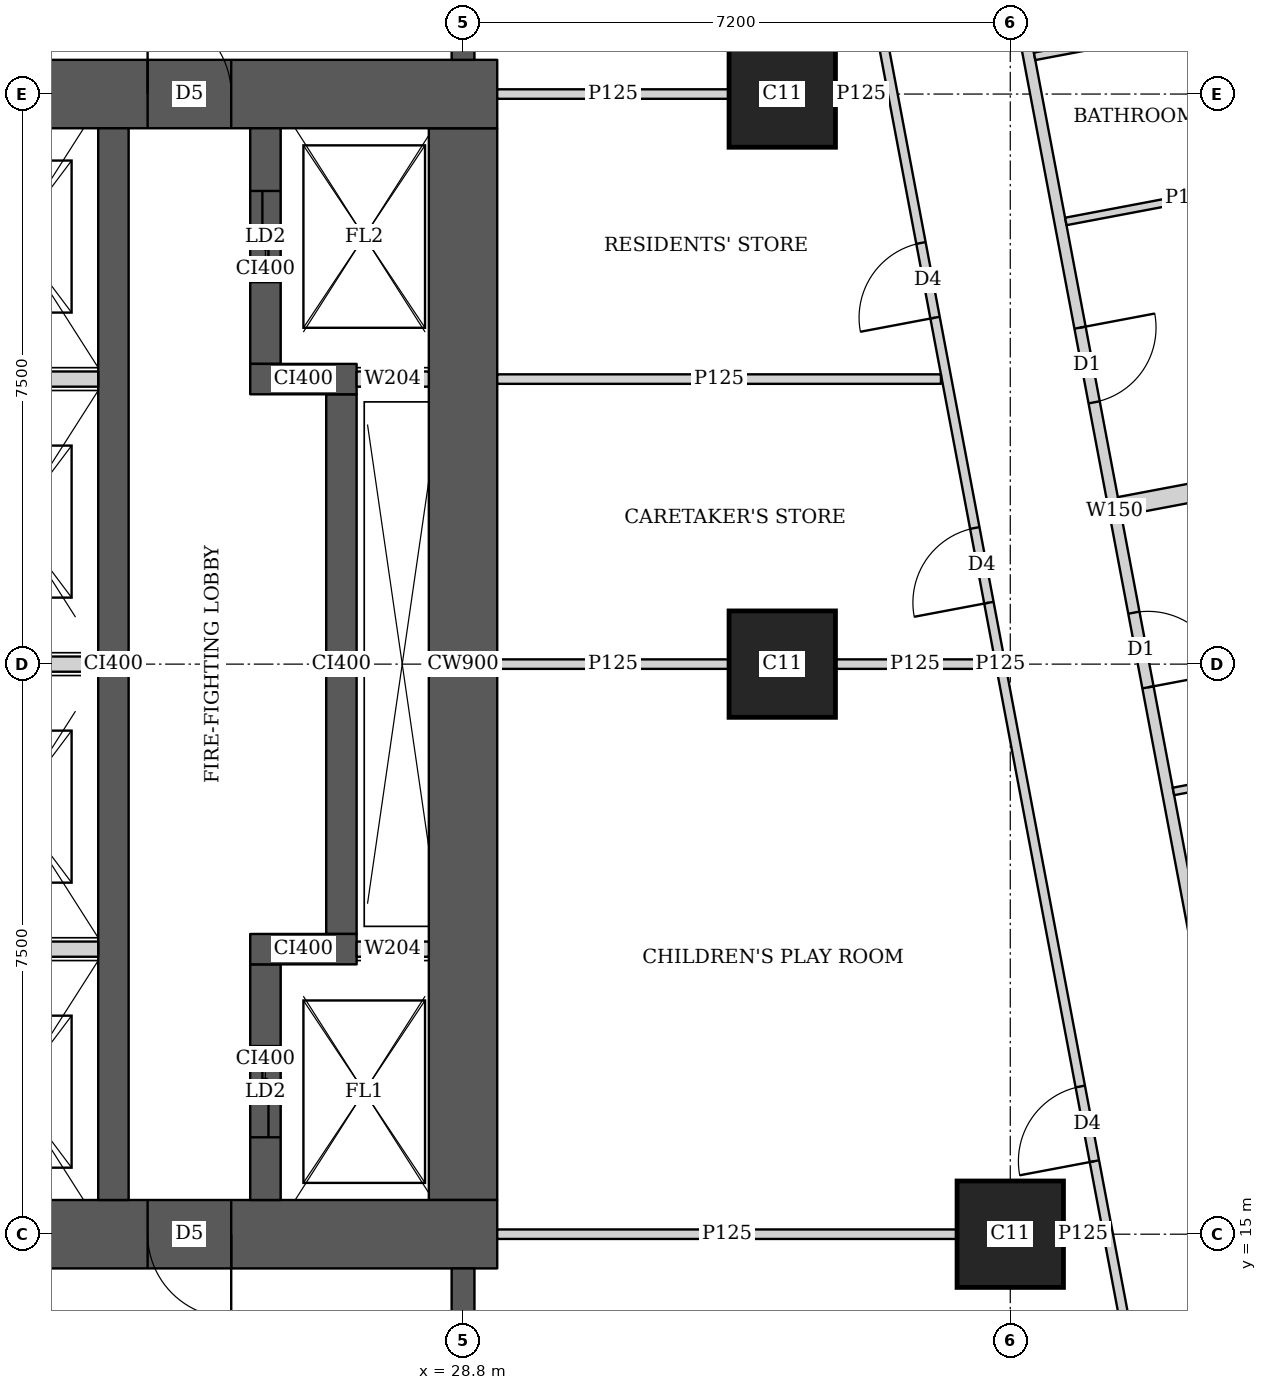
"""IFC4 building model, lengths in metres.
Left out: names, types, materials, properties, quantities, classifications, styles, units other than length and angle.
Written with IfcOpenShell. Run it as: python <this file> out.ifc"""

import sys

from ifc_helpers import new_model, si_unit, direction, frame, frame_2d, origin, origin_2d, place, context, subcontext, project, spatial, rectangle, extrude, element, fill, save


model = new_model("IFC4")
c1 = context("Model", 3, precision=1e-05, world=origin(), true_north=direction((0.0, 1.0)))
c2 = subcontext(c1, "Body", "Model", "MODEL_VIEW")
j1 = project(units=[si_unit("LENGTHUNIT", "METRE"), si_unit("PLANEANGLEUNIT", "RADIAN")], contexts=[c1])
p1 = place(None, origin())
s1 = spatial("IfcSite", under=j1, at=p1, CompositionType="ELEMENT")
p2 = place(p1, origin())
s2 = spatial("IfcBuilding", under=s1, at=p2, CompositionType="ELEMENT")
p3 = place(p2, frame((0.0, 0.0, 262.85)))
s3 = spatial("IfcBuildingStorey", under=s2, at=p3, CompositionType="ELEMENT", Elevation=262.85)
for number, where, z_axis, x_axis in (
    (1, (36.0, 15.0, 0.0), (0.0, 0.0, 1.0), (1.0, 0.0, 0.0)),
    (2, (33.0, 22.5, 0.0), (0.0, 0.0, 1.0), (1.0, 0.0, 0.0)),
    (3, (33.0, 30.0, 0.0), (0.0, 0.0, 1.0), (1.0, 0.0, 0.0)),
):
    element("IfcColumn", number, at=place(p3, frame(where, z_axis=z_axis, x_axis=x_axis)), inside=s3, PredefinedType="COLUMN", context=c2, shape_type="SweptSolid", body=[
        extrude(rectangle(XDim=1.4, YDim=1.4, at=origin_2d()), origin(), (0.0, 0.0, 1.0), 3.75),
    ])
p4 = place(p3, frame((13.95, 15.0, 0.0), z_axis=(0.0, 0.0, 1.0), x_axis=(1.0, 0.0, 0.0)))
e4 = element("IfcWall", 4, at=p4, inside=s3, PredefinedType="SHEAR", context=c2, shape_type="SweptSolid", body=[
    extrude(rectangle(XDim=15.3, YDim=0.9, at=frame_2d((7.65, 0.0))), origin(), (0.0, 0.0, 1.0), 3.75),
])
p5 = place(p4, frame((4.45, 0.0, 0.0)))
e5 = element("IfcOpeningElement", 5, at=p5, cuts=e4, PredefinedType="OPENING", context=c2, shape_type="SweptSolid", body=[
    extrude(rectangle(XDim=1.8, YDim=2.1, at=frame_2d((0.9, 1.05))), frame((0.0, 0.46, 0.0), z_axis=(0.0, -1.0, 0.0), x_axis=(1.0, 0.0, 0.0)), (0.0, 0.0, 1.0), 0.92),
])
p6 = place(p4, frame((10.7, 0.0, 0.0)))
e6 = element("IfcOpeningElement", 6, at=p6, cuts=e4, PredefinedType="OPENING", context=c2, shape_type="SweptSolid", body=[
    extrude(rectangle(XDim=1.1, YDim=2.1, at=frame_2d((0.55, 1.05))), frame((0.0, 0.46, 0.0), z_axis=(0.0, -1.0, 0.0), x_axis=(1.0, 0.0, 0.0)), (0.0, 0.0, 1.0), 0.92),
])
p7 = place(p3, frame((13.95, 30.0, 0.0), z_axis=(0.0, 0.0, 1.0), x_axis=(1.0, 0.0, 0.0)))
e7 = element("IfcWall", 7, at=p7, inside=s3, PredefinedType="SHEAR", context=c2, shape_type="SweptSolid", body=[
    extrude(rectangle(XDim=15.3, YDim=0.9, at=frame_2d((7.65, 0.0))), origin(), (0.0, 0.0, 1.0), 3.75),
])
p8 = place(p7, frame((4.45, 0.0, 0.0)))
e8 = element("IfcOpeningElement", 8, at=p8, cuts=e7, PredefinedType="OPENING", context=c2, shape_type="SweptSolid", body=[
    extrude(rectangle(XDim=1.8, YDim=2.1, at=frame_2d((0.9, 1.05))), frame((0.0, 0.46, 0.0), z_axis=(0.0, -1.0, 0.0), x_axis=(1.0, 0.0, 0.0)), (0.0, 0.0, 1.0), 0.92),
])
p9 = place(p7, frame((10.7, 0.0, 0.0)))
e9 = element("IfcOpeningElement", 9, at=p9, cuts=e7, PredefinedType="OPENING", context=c2, shape_type="SweptSolid", body=[
    extrude(rectangle(XDim=1.1, YDim=2.1, at=frame_2d((0.55, 1.05))), frame((0.0, 0.46, 0.0), z_axis=(0.0, -1.0, 0.0), x_axis=(1.0, 0.0, 0.0)), (0.0, 0.0, 1.0), 0.92),
])
p10 = place(p3, frame((28.8, 15.45, 0.0), z_axis=(0.0, 0.0, 1.0), x_axis=(0.0, 1.0, 0.0)))
e10 = element("IfcWall", 10, at=p10, inside=s3, PredefinedType="SHEAR", context=c2, shape_type="SweptSolid", body=[
    extrude(rectangle(XDim=14.1, YDim=0.9, at=frame_2d((7.05, 0.0))), origin(), (0.0, 0.0, 1.0), 3.75),
])
p11 = place(p3, frame((24.2, 15.45, 0.0), z_axis=(0.0, 0.0, 1.0), x_axis=(0.0, 1.0, 0.0)))
e11 = element("IfcWall", 11, at=p11, inside=s3, PredefinedType="SHEAR", context=c2, shape_type="SweptSolid", body=[
    extrude(rectangle(XDim=14.1, YDim=0.4, at=frame_2d((7.05, 0.0))), origin(), (0.0, 0.0, 1.0), 3.75),
])
p12 = place(p3, frame((26.2, 15.45, 0.0), z_axis=(0.0, 0.0, 1.0), x_axis=(0.0, 1.0, 0.0)))
e12 = element("IfcWall", 12, at=p12, inside=s3, PredefinedType="SHEAR", context=c2, shape_type="SweptSolid", body=[
    extrude(rectangle(XDim=3.1, YDim=0.4, at=frame_2d((1.55, 0.0))), origin(), (0.0, 0.0, 1.0), 3.75),
])
p13 = place(p12, frame((0.825, 0.0, 0.0)))
e13 = element("IfcOpeningElement", 13, at=p13, cuts=e12, PredefinedType="OPENING", context=c2, shape_type="SweptSolid", body=[
    extrude(rectangle(XDim=1.2, YDim=2.1, at=frame_2d((0.6, 1.05))), frame((0.0, 0.21, 0.0), z_axis=(0.0, -1.0, 0.0), x_axis=(1.0, 0.0, 0.0)), (0.0, 0.0, 1.0), 0.42),
])
p14 = place(p3, frame((26.0, 18.75, 0.0), z_axis=(0.0, 0.0, 1.0), x_axis=(1.0, 0.0, 0.0)))
e14 = element("IfcWall", 14, at=p14, inside=s3, PredefinedType="SHEAR", context=c2, shape_type="SweptSolid", body=[
    extrude(rectangle(XDim=1.4, YDim=0.4, at=frame_2d((0.7, 0.0))), origin(), (0.0, 0.0, 1.0), 3.75),
])
p15 = place(p3, frame((27.2, 18.95, 0.0), z_axis=(0.0, 0.0, 1.0), x_axis=(0.0, 1.0, 0.0)))
e15 = element("IfcWall", 15, at=p15, inside=s3, PredefinedType="SHEAR", context=c2, shape_type="SweptSolid", body=[
    extrude(rectangle(XDim=7.1, YDim=0.4, at=frame_2d((3.55, 0.0))), origin(), (0.0, 0.0, 1.0), 3.75),
])
p16 = place(p3, frame((26.0, 26.25, 0.0), z_axis=(0.0, 0.0, 1.0), x_axis=(1.0, 0.0, 0.0)))
e16 = element("IfcWall", 16, at=p16, inside=s3, PredefinedType="SHEAR", context=c2, shape_type="SweptSolid", body=[
    extrude(rectangle(XDim=1.4, YDim=0.4, at=frame_2d((0.7, 0.0))), origin(), (0.0, 0.0, 1.0), 3.75),
])
p17 = place(p3, frame((26.2, 26.45, 0.0), z_axis=(0.0, 0.0, 1.0), x_axis=(0.0, 1.0, 0.0)))
e17 = element("IfcWall", 17, at=p17, inside=s3, PredefinedType="SHEAR", context=c2, shape_type="SweptSolid", body=[
    extrude(rectangle(XDim=3.1, YDim=0.4, at=frame_2d((1.55, 0.0))), origin(), (0.0, 0.0, 1.0), 3.75),
])
p18 = place(p17, frame((1.075, 0.0, 0.0)))
e18 = element("IfcOpeningElement", 18, at=p18, cuts=e17, PredefinedType="OPENING", context=c2, shape_type="SweptSolid", body=[
    extrude(rectangle(XDim=1.2, YDim=2.1, at=frame_2d((0.6, 1.05))), frame((0.0, 0.21, 0.0), z_axis=(0.0, -1.0, 0.0), x_axis=(1.0, 0.0, 0.0)), (0.0, 0.0, 1.0), 0.42),
])
for number, where, z_axis, x_axis in (
    (19, (28.8, 10.35, 0.0), (0.0, 0.0, 1.0), (0.0, 1.0, 0.0)),
    (20, (28.8, 30.45, 0.0), (0.0, 0.0, 1.0), (0.0, 1.0, 0.0)),
):
    element("IfcWall", number, at=place(p3, frame(where, z_axis=z_axis, x_axis=x_axis)), inside=s3, PredefinedType="SHEAR", context=c2, shape_type="SweptSolid", body=[
        extrude(rectangle(XDim=4.2, YDim=0.3, at=frame_2d((2.1, 0.0))), origin(), (0.0, 0.0, 1.0), 3.75),
    ])
p19 = place(p3, frame((34.036, 42.186, 0.0), z_axis=(0.0, 0.0, 1.0), x_axis=(0.185593518645, -0.9826266055, 0.0)))
e21 = element("IfcWall", 21, at=p19, inside=s3, PredefinedType="SOLIDWALL", context=c2, shape_type="SweptSolid", body=[
    extrude(rectangle(XDim=35.961, YDim=0.15, at=frame_2d((17.98, 0.0))), origin(), (0.0, 0.0, 1.0), 2.5),
])
p20 = place(p19, frame((15.529, 0.0, 0.0)))
e22 = element("IfcOpeningElement", 22, at=p20, cuts=e21, PredefinedType="OPENING", context=c2, shape_type="SweptSolid", body=[
    extrude(rectangle(XDim=1.0, YDim=2.1, at=frame_2d((0.5, 1.05))), frame((0.0, 0.085, 0.0), z_axis=(0.0, -1.0, 0.0), x_axis=(1.0, 0.0, 0.0)), (0.0, 0.0, 1.0), 0.17),
])
p21 = place(p19, frame((19.345, 0.0, 0.0)))
e23 = element("IfcOpeningElement", 23, at=p21, cuts=e21, PredefinedType="OPENING", context=c2, shape_type="SweptSolid", body=[
    extrude(rectangle(XDim=1.0, YDim=2.1, at=frame_2d((0.5, 1.05))), frame((0.0, 0.085, 0.0), z_axis=(0.0, -1.0, 0.0), x_axis=(1.0, 0.0, 0.0)), (0.0, 0.0, 1.0), 0.17),
])
p22 = place(p19, frame((30.594, 0.0, 0.0)))
e24 = element("IfcOpeningElement", 24, at=p22, cuts=e21, PredefinedType="OPENING", context=c2, shape_type="SweptSolid", body=[
    extrude(rectangle(XDim=1.0, YDim=2.1, at=frame_2d((0.5, 1.05))), frame((0.0, 0.085, 0.0), z_axis=(0.0, -1.0, 0.0), x_axis=(1.0, 0.0, 0.0)), (0.0, 0.0, 1.0), 0.17),
])
p23 = place(p3, frame((37.511, 42.109, 0.0), z_axis=(0.0, 0.0, 1.0), x_axis=(0.185550464988, -0.982634736279, 0.0)))
e25 = element("IfcWall", 25, at=p23, inside=s3, PredefinedType="PARTITIONING", context=c2, shape_type="SweptSolid", body=[
    extrude(rectangle(XDim=13.35, YDim=0.1, at=frame_2d((6.675, 0.0))), origin(), (0.0, 0.0, 1.0), 2.5),
])
p24 = place(p23, frame((11.845, 0.0, 0.0)))
e26 = element("IfcOpeningElement", 26, at=p24, cuts=e25, PredefinedType="OPENING", context=c2, shape_type="SweptSolid", body=[
    extrude(rectangle(XDim=0.9, YDim=2.1, at=frame_2d((0.45, 1.05))), frame((0.0, 0.06, 0.0), z_axis=(0.0, -1.0, 0.0), x_axis=(1.0, 0.0, 0.0)), (0.0, 0.0, 1.0), 0.12),
])
p25 = place(p23, frame((8.224, 0.0, 0.0)))
e27 = element("IfcOpeningElement", 27, at=p25, cuts=e25, PredefinedType="OPENING", context=c2, shape_type="SweptSolid", body=[
    extrude(rectangle(XDim=0.9, YDim=2.1, at=frame_2d((0.45, 1.05))), frame((0.0, 0.06, 0.0), z_axis=(0.0, -1.0, 0.0), x_axis=(1.0, 0.0, 0.0)), (0.0, 0.0, 1.0), 0.12),
])
p26 = place(p23, frame((2.65, 0.0, 0.0)))
e28 = element("IfcOpeningElement", 28, at=p26, cuts=e25, PredefinedType="OPENING", context=c2, shape_type="SweptSolid", body=[
    extrude(rectangle(XDim=0.9, YDim=2.1, at=frame_2d((0.45, 1.05))), frame((0.0, 0.06, 0.0), z_axis=(0.0, -1.0, 0.0), x_axis=(1.0, 0.0, 0.0)), (0.0, 0.0, 1.0), 0.12),
])
p27 = place(p23, frame((9.936, 0.0, 0.0)))
e29 = element("IfcOpeningElement", 29, at=p27, cuts=e25, PredefinedType="OPENING", context=c2, shape_type="SweptSolid", body=[
    extrude(rectangle(XDim=0.9, YDim=2.1, at=frame_2d((0.45, 1.05))), frame((0.0, 0.06, 0.0), z_axis=(0.0, -1.0, 0.0), x_axis=(1.0, 0.0, 0.0)), (0.0, 0.0, 1.0), 0.12),
])
p28 = place(p23, frame((5.555, 0.0, 0.0)))
e30 = element("IfcOpeningElement", 30, at=p28, cuts=e25, PredefinedType="OPENING", context=c2, shape_type="SweptSolid", body=[
    extrude(rectangle(XDim=0.9, YDim=2.1, at=frame_2d((0.45, 1.05))), frame((0.0, 0.06, 0.0), z_axis=(0.0, -1.0, 0.0), x_axis=(1.0, 0.0, 0.0)), (0.0, 0.0, 1.0), 0.12),
])
p29 = place(p3, frame((39.997, 28.942, 0.0), z_axis=(0.0, 0.0, 1.0), x_axis=(-0.982569883123, -0.185893584556, 0.0)))
e31 = element("IfcWall", 31, at=p29, inside=s3, PredefinedType="PARTITIONING", context=c2, shape_type="SweptSolid", body=[
    extrude(rectangle(XDim=3.324, YDim=0.1, at=frame_2d((1.662, 0.0))), origin(), (0.0, 0.0, 1.0), 3.5),
])
p30 = place(p3, frame((39.538, 31.104, 0.0), z_axis=(0.0, 0.0, 1.0), x_axis=(-0.982620626894, -0.185625169636, 0.0)))
e32 = element("IfcWall", 32, at=p30, inside=s3, PredefinedType="PARTITIONING", context=c2, shape_type="SweptSolid", body=[
    extrude(rectangle(XDim=3.275, YDim=0.1, at=frame_2d((1.637, 0.0))), origin(), (0.0, 0.0, 1.0), 2.5),
])
p31 = place(p3, frame((41.365, 21.433, 0.0), z_axis=(0.0, 0.0, 1.0), x_axis=(-0.982607026909, -0.185697147715, 0.0)))
e33 = element("IfcWall", 33, at=p31, inside=s3, PredefinedType="PARTITIONING", context=c2, shape_type="SweptSolid", body=[
    extrude(rectangle(XDim=3.275, YDim=0.1, at=frame_2d((1.637, 0.0))), origin(), (0.0, 0.0, 1.0), 3.5),
])
p32 = place(p3, frame((41.885, 25.415, 0.0), z_axis=(0.0, 0.0, 1.0), x_axis=(-0.982612837616, -0.185666398014, 0.0)))
e34 = element("IfcWall", 34, at=p32, inside=s3, PredefinedType="SOLIDWALL", context=c2, shape_type="SweptSolid", body=[
    extrude(rectangle(XDim=4.525, YDim=0.25, at=frame_2d((2.262, 0.0))), origin(), (0.0, 0.0, 1.0), 3.5),
])
p33 = place(p3, frame((38.202, 10.163, 0.0), z_axis=(0.0, 0.0, 1.0), x_axis=(-0.185610321132, 0.982623431783, 0.0)))
e35 = element("IfcWall", 35, at=p33, inside=s3, PredefinedType="PARTITIONING", context=c2, shape_type="SweptSolid", body=[
    extrude(rectangle(XDim=25.111, YDim=0.125, at=frame_2d((12.556, 0.0))), origin(), (0.0, 0.0, 1.0), 2.5),
])
p34 = place(p33, frame((0.708, 0.0, 0.0)))
e36 = element("IfcOpeningElement", 36, at=p34, cuts=e35, PredefinedType="OPENING", context=c2, shape_type="SweptSolid", body=[
    extrude(rectangle(XDim=1.0, YDim=2.1, at=frame_2d((0.5, 1.05))), frame((0.0, 0.073, 0.0), z_axis=(0.0, -1.0, 0.0), x_axis=(1.0, 0.0, 0.0)), (0.0, 0.0, 1.0), 0.145),
])
p35 = place(p33, frame((5.9, 0.0, 0.0)))
e37 = element("IfcOpeningElement", 37, at=p35, cuts=e35, PredefinedType="OPENING", context=c2, shape_type="SweptSolid", body=[
    extrude(rectangle(XDim=1.0, YDim=2.1, at=frame_2d((0.5, 1.05))), frame((0.0, 0.073, 0.0), z_axis=(0.0, -1.0, 0.0), x_axis=(1.0, 0.0, 0.0)), (0.0, 0.0, 1.0), 0.145),
])
p36 = place(p33, frame((13.378, 0.0, 0.0)))
e38 = element("IfcOpeningElement", 38, at=p36, cuts=e35, PredefinedType="OPENING", context=c2, shape_type="SweptSolid", body=[
    extrude(rectangle(XDim=1.0, YDim=2.1, at=frame_2d((0.5, 1.05))), frame((0.0, 0.073, 0.0), z_axis=(0.0, -1.0, 0.0), x_axis=(1.0, 0.0, 0.0)), (0.0, 0.0, 1.0), 0.145),
])
p37 = place(p33, frame((17.194, 0.0, 0.0)))
e39 = element("IfcOpeningElement", 39, at=p37, cuts=e35, PredefinedType="OPENING", context=c2, shape_type="SweptSolid", body=[
    extrude(rectangle(XDim=1.0, YDim=2.1, at=frame_2d((0.5, 1.05))), frame((0.0, 0.073, 0.0), z_axis=(0.0, -1.0, 0.0), x_axis=(1.0, 0.0, 0.0)), (0.0, 0.0, 1.0), 0.145),
])
p38 = place(p33, frame((21.15, 0.0, 0.0)))
e40 = element("IfcOpeningElement", 40, at=p38, cuts=e35, PredefinedType="OPENING", context=c2, shape_type="SweptSolid", body=[
    extrude(rectangle(XDim=1.0, YDim=2.1, at=frame_2d((0.5, 1.05))), frame((0.0, 0.073, 0.0), z_axis=(0.0, -1.0, 0.0), x_axis=(1.0, 0.0, 0.0)), (0.0, 0.0, 1.0), 0.145),
])
p39 = place(p3, frame((29.25, 15.0, 0.0), z_axis=(0.0, 0.0, 1.0), x_axis=(1.0, 0.0, 0.0)))
e41 = element("IfcWall", 41, at=p39, inside=s3, PredefinedType="PARTITIONING", context=c2, shape_type="SweptSolid", body=[
    extrude(rectangle(XDim=6.049, YDim=0.125, at=frame_2d((3.024, 0.0))), origin(), (0.0, 0.0, 1.0), 3.5),
])
p40 = place(p3, frame((36.701, 15.0, 0.0), z_axis=(0.0, 0.0, 1.0), x_axis=(1.0, 0.0, 0.0)))
e42 = element("IfcWall", 42, at=p40, inside=s3, PredefinedType="PARTITIONING", context=c2, shape_type="SweptSolid", body=[
    extrude(rectangle(XDim=0.512, YDim=0.125, at=frame_2d((0.256, 0.0))), origin(), (0.0, 0.0, 1.0), 3.5),
])
p41 = place(p3, frame((29.25, 22.5, 0.0), z_axis=(0.0, 0.0, 1.0), x_axis=(1.0, 0.0, 0.0)))
e43 = element("IfcWall", 43, at=p41, inside=s3, PredefinedType="PARTITIONING", context=c2, shape_type="SweptSolid", body=[
    extrude(rectangle(XDim=3.049, YDim=0.125, at=frame_2d((1.524, 0.0))), origin(), (0.0, 0.0, 1.0), 3.5),
])
p42 = place(p3, frame((33.701, 22.5, 0.0), z_axis=(0.0, 0.0, 1.0), x_axis=(1.0, 0.0, 0.0)))
e44 = element("IfcWall", 44, at=p42, inside=s3, PredefinedType="PARTITIONING", context=c2, shape_type="SweptSolid", body=[
    extrude(rectangle(XDim=2.095, YDim=0.125, at=frame_2d((1.047, 0.0))), origin(), (0.0, 0.0, 1.0), 2.5),
])
p43 = place(p3, frame((29.25, 26.25, 0.0), z_axis=(0.0, 0.0, 1.0), x_axis=(1.0, 0.0, 0.0)))
e45 = element("IfcWall", 45, at=p43, inside=s3, PredefinedType="PARTITIONING", context=c2, shape_type="SweptSolid", body=[
    extrude(rectangle(XDim=5.838, YDim=0.125, at=frame_2d((2.919, 0.0))), origin(), (0.0, 0.0, 1.0), 3.5),
])
p44 = place(p3, frame((29.25, 30.0, 0.0), z_axis=(0.0, 0.0, 1.0), x_axis=(1.0, 0.0, 0.0)))
e46 = element("IfcWall", 46, at=p44, inside=s3, PredefinedType="PARTITIONING", context=c2, shape_type="SweptSolid", body=[
    extrude(rectangle(XDim=3.049, YDim=0.125, at=frame_2d((1.524, 0.0))), origin(), (0.0, 0.0, 1.0), 3.5),
])
p45 = place(p3, frame((33.701, 30.0, 0.0), z_axis=(0.0, 0.0, 1.0), x_axis=(1.0, 0.0, 0.0)))
e47 = element("IfcWall", 47, at=p45, inside=s3, PredefinedType="PARTITIONING", context=c2, shape_type="SweptSolid", body=[
    extrude(rectangle(XDim=0.678, YDim=0.125, at=frame_2d((0.339, 0.0))), origin(), (0.0, 0.0, 1.0), 2.5),
])
for number, where, z_axis, x_axis in (
    (48, (21.8, 18.75, 0.0), (0.0, 0.0, 1.0), (1.0, 0.0, 0.0)),
    (49, (21.8, 22.5, 0.0), (0.0, 0.0, 1.0), (1.0, 0.0, 0.0)),
    (50, (21.8, 26.25, 0.0), (0.0, 0.0, 1.0), (1.0, 0.0, 0.0)),
):
    element("IfcWall", number, at=place(p3, frame(where, z_axis=z_axis, x_axis=x_axis)), inside=s3, PredefinedType="SOLIDWALL", context=c2, shape_type="SweptSolid", body=[
        extrude(rectangle(XDim=2.2, YDim=0.2, at=frame_2d((1.1, 0.0))), origin(), (0.0, 0.0, 1.0), 3.5),
    ])
for number, where, z_axis, x_axis in (
    (51, (27.4, 18.75, 0.0), (0.0, 0.0, 1.0), (1.0, 0.0, 0.0)),
    (52, (27.4, 26.25, 0.0), (0.0, 0.0, 1.0), (1.0, 0.0, 0.0)),
):
    element("IfcWall", number, at=place(p3, frame(where, z_axis=z_axis, x_axis=x_axis)), inside=s3, PredefinedType="SOLIDWALL", context=c2, shape_type="SweptSolid", body=[
        extrude(rectangle(XDim=0.95, YDim=0.2, at=frame_2d((0.475, 0.0))), origin(), (0.0, 0.0, 1.0), 3.5),
    ])
p46 = place(p20, origin())
e53 = element("IfcDoor", 53, at=p46, inside=s3, OperationType="SINGLE_SWING_LEFT", PredefinedType="DOOR", context=c2, shape_type="SweptSolid", body=[
    extrude(rectangle(XDim=1.0, YDim=2.1, at=frame_2d((0.5, 1.05))), frame((0.0, 0.025, 0.0), z_axis=(0.0, -1.0, 0.0), x_axis=(1.0, 0.0, 0.0)), (0.0, 0.0, 1.0), 0.05),
])
fill(e22, e53)
p47 = place(p21, origin())
e54 = element("IfcDoor", 54, at=p47, inside=s3, OperationType="SINGLE_SWING_RIGHT", PredefinedType="DOOR", context=c2, shape_type="SweptSolid", body=[
    extrude(rectangle(XDim=1.0, YDim=2.1, at=frame_2d((0.5, 1.05))), frame((0.0, 0.025, 0.0), z_axis=(0.0, -1.0, 0.0), x_axis=(1.0, 0.0, 0.0)), (0.0, 0.0, 1.0), 0.05),
])
fill(e23, e54)
p48 = place(p35, origin())
e55 = element("IfcDoor", 55, at=p48, inside=s3, OperationType="SINGLE_SWING_LEFT", PredefinedType="DOOR", context=c2, shape_type="SweptSolid", body=[
    extrude(rectangle(XDim=1.0, YDim=2.1, at=frame_2d((0.5, 1.05))), frame((0.0, 0.025, 0.0), z_axis=(0.0, -1.0, 0.0), x_axis=(1.0, 0.0, 0.0)), (0.0, 0.0, 1.0), 0.05),
])
fill(e37, e55)
p49 = place(p36, origin())
e56 = element("IfcDoor", 56, at=p49, inside=s3, OperationType="SINGLE_SWING_LEFT", PredefinedType="DOOR", context=c2, shape_type="SweptSolid", body=[
    extrude(rectangle(XDim=1.0, YDim=2.1, at=frame_2d((0.5, 1.05))), frame((0.0, 0.025, 0.0), z_axis=(0.0, -1.0, 0.0), x_axis=(1.0, 0.0, 0.0)), (0.0, 0.0, 1.0), 0.05),
])
fill(e38, e56)
p50 = place(p37, origin())
e57 = element("IfcDoor", 57, at=p50, inside=s3, OperationType="SINGLE_SWING_LEFT", PredefinedType="DOOR", context=c2, shape_type="SweptSolid", body=[
    extrude(rectangle(XDim=1.0, YDim=2.1, at=frame_2d((0.5, 1.05))), frame((0.0, 0.025, 0.0), z_axis=(0.0, -1.0, 0.0), x_axis=(1.0, 0.0, 0.0)), (0.0, 0.0, 1.0), 0.05),
])
fill(e39, e57)
p51 = place(p6, origin())
e58 = element("IfcDoor", 58, at=p51, inside=s3, OperationType="SINGLE_SWING_LEFT", PredefinedType="DOOR", context=c2, shape_type="SweptSolid", body=[
    extrude(rectangle(XDim=1.1, YDim=2.1, at=frame_2d((0.55, 1.05))), frame((0.0, 0.025, 0.0), z_axis=(0.0, -1.0, 0.0), x_axis=(1.0, 0.0, 0.0)), (0.0, 0.0, 1.0), 0.05),
])
fill(e6, e58)
p52 = place(p9, origin())
e59 = element("IfcDoor", 59, at=p52, inside=s3, OperationType="SINGLE_SWING_LEFT", PredefinedType="DOOR", context=c2, shape_type="SweptSolid", body=[
    extrude(rectangle(XDim=1.1, YDim=2.1, at=frame_2d((0.55, 1.05))), frame((0.0, 0.025, 0.0), z_axis=(0.0, -1.0, 0.0), x_axis=(1.0, 0.0, 0.0)), (0.0, 0.0, 1.0), 0.05),
])
fill(e9, e59)
p53 = place(p13, origin())
e60 = element("IfcDoor", 60, at=p53, inside=s3, OperationType="DOUBLE_DOOR_SLIDING", PredefinedType="DOOR", context=c2, shape_type="SweptSolid", body=[
    extrude(rectangle(XDim=1.2, YDim=2.1, at=frame_2d((0.6, 1.05))), frame((0.0, 0.025, 0.0), z_axis=(0.0, -1.0, 0.0), x_axis=(1.0, 0.0, 0.0)), (0.0, 0.0, 1.0), 0.05),
])
fill(e13, e60)
p54 = place(p18, origin())
e61 = element("IfcDoor", 61, at=p54, inside=s3, OperationType="DOUBLE_DOOR_SLIDING", PredefinedType="DOOR", context=c2, shape_type="SweptSolid", body=[
    extrude(rectangle(XDim=1.2, YDim=2.1, at=frame_2d((0.6, 1.05))), frame((0.0, 0.025, 0.0), z_axis=(0.0, -1.0, 0.0), x_axis=(1.0, 0.0, 0.0)), (0.0, 0.0, 1.0), 0.05),
])
fill(e18, e61)
save(model, sys.argv[1])
